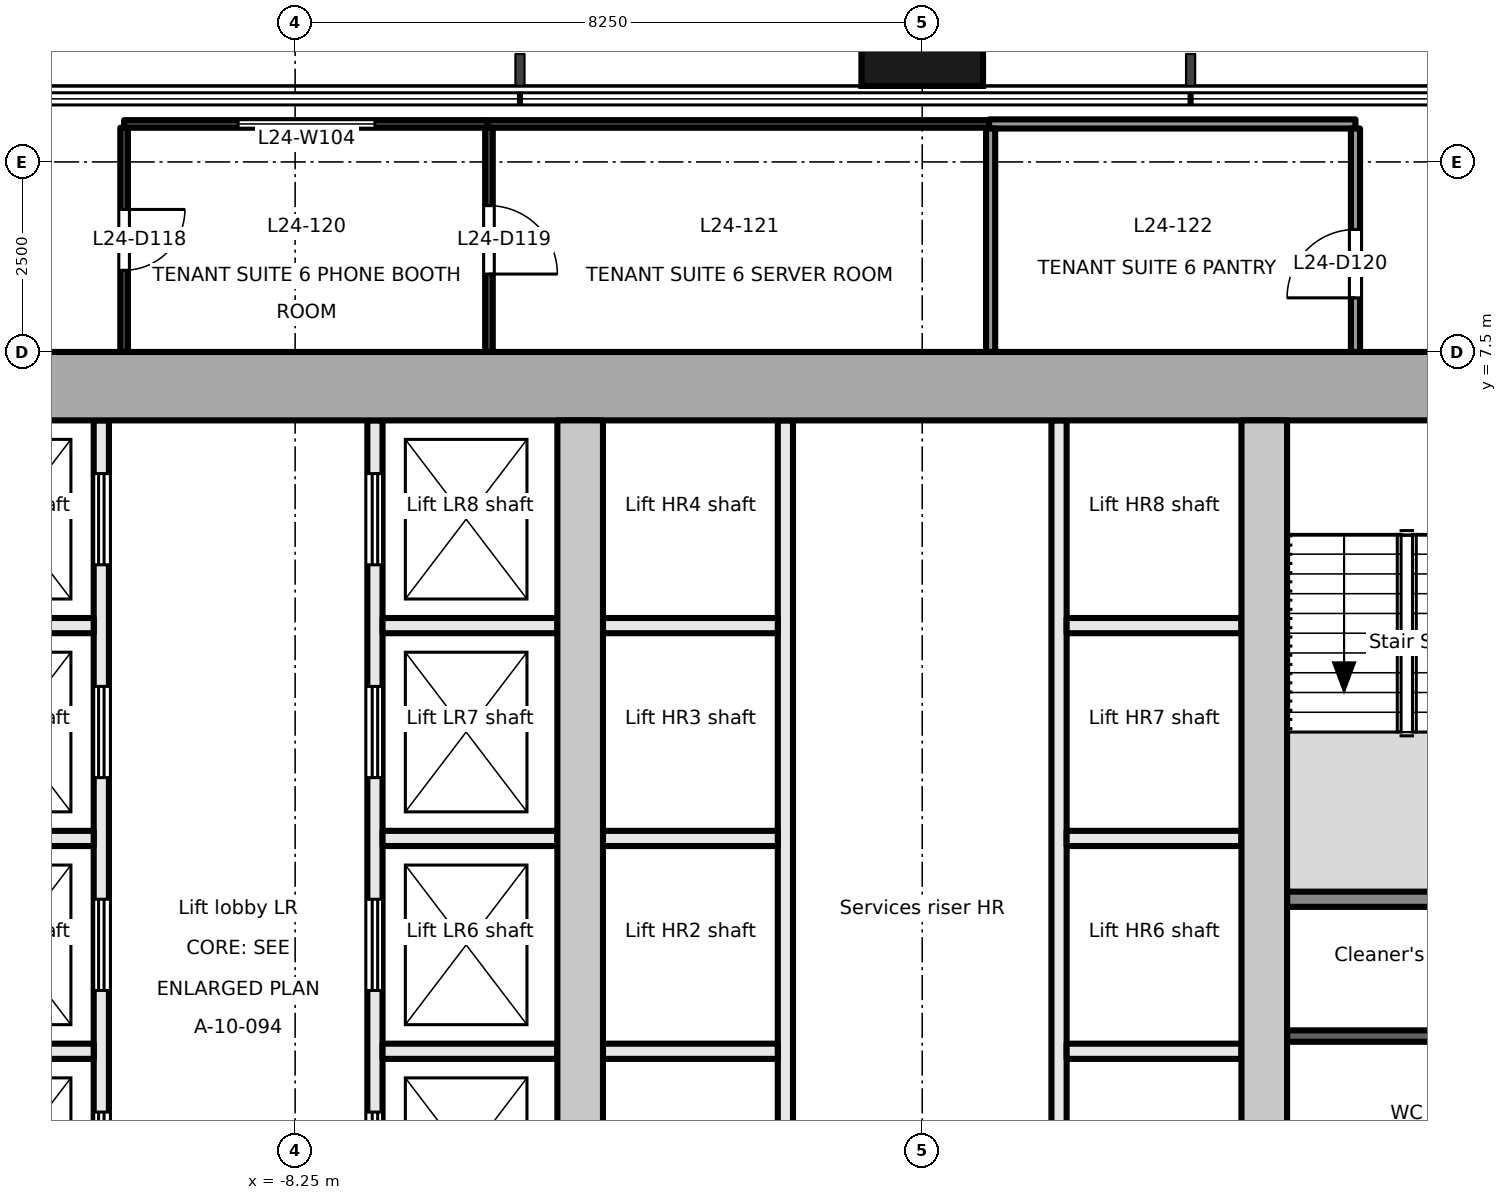
"""IFC4 building model, lengths in metres.
Left out: names, types, materials, properties, quantities, classifications, styles, units other than length and angle.
Written with IfcOpenShell. Run it as: python <this file> out.ifc"""

import sys

from ifc_helpers import new_model, si_unit, direction, frame, frame_2d, origin, origin_2d, place, context, subcontext, project, spatial, rectangle, extrude, element, fill, save


model = new_model("IFC4")
c1 = context("Model", 3, precision=1e-05, world=origin(), true_north=direction((0.0, 1.0)))
c2 = subcontext(c1, "Body", "Model", "MODEL_VIEW")
j1 = project(units=[si_unit("LENGTHUNIT", "METRE"), si_unit("PLANEANGLEUNIT", "RADIAN")], contexts=[c1])
p1 = place(None, origin())
s1 = spatial("IfcSite", under=j1, at=p1, CompositionType="ELEMENT")
p2 = place(p1, origin())
s2 = spatial("IfcBuilding", under=s1, at=p2, CompositionType="ELEMENT")
p3 = place(p2, frame((0.0, 0.0, 107.7)))
s3 = spatial("IfcBuildingStorey", under=s2, at=p3, CompositionType="ELEMENT", Elevation=107.7)
p4 = place(p3, frame((0.0, 11.9, -0.2), z_axis=(0.0, 0.0, 1.0), x_axis=(1.0, 0.0, 0.0)))
e1 = element("IfcColumn", 1, at=p4, inside=s3, PredefinedType="COLUMN", context=c2, shape_type="SweptSolid", body=[
    extrude(rectangle(XDim=1.6, YDim=1.8, at=origin_2d()), origin(), (0.0, 0.0, 1.0), 4.0),
])
p5 = place(p3, frame((-18.0, 7.05, -0.2), z_axis=(0.0, 0.0, 1.0), x_axis=(1.0, 0.0, 0.0)))
e2 = element("IfcWall", 2, at=p5, inside=s3, PredefinedType="SHEAR", context=c2, shape_type="SweptSolid", body=[
    extrude(rectangle(XDim=36.0, YDim=0.9, at=frame_2d((18.0, 0.0))), origin(), (0.0, 0.0, 1.0), 4.0),
])
for number, where, z_axis, x_axis in (
    (3, (-4.5, -6.6, -0.2), (0.0, 0.0, 1.0), (0.0, 1.0, 0.0)),
    (4, (4.5, -6.6, -0.2), (0.0, 0.0, 1.0), (0.0, 1.0, 0.0)),
):
    element("IfcWall", number, at=place(p3, frame(where, z_axis=z_axis, x_axis=x_axis)), inside=s3, PredefinedType="SHEAR", context=c2, shape_type="SweptSolid", body=[
        extrude(rectangle(XDim=13.2, YDim=0.6, at=frame_2d((6.6, 0.0))), origin(), (0.0, 0.0, 1.0), 4.0),
    ])
p6 = place(p3, frame((-10.8, -6.6, 0.0), z_axis=(0.0, 0.0, 1.0), x_axis=(0.0, 1.0, 0.0)))
e5 = element("IfcWall", 5, at=p6, inside=s3, PredefinedType="PARTITIONING", context=c2, shape_type="SweptSolid", body=[
    extrude(rectangle(XDim=13.2, YDim=0.2, at=frame_2d((6.6, 0.0))), origin(), (0.0, 0.0, 1.0), 3.8),
])
p7 = place(p6, frame((0.55, 0.0, 0.0)))
e6 = element("IfcOpeningElement", 6, at=p7, cuts=e5, PredefinedType="OPENING", context=c2, shape_type="SweptSolid", body=[
    extrude(rectangle(XDim=0.9, YDim=2.1, at=frame_2d((0.45, 1.05))), frame((0.0, 0.111, 0.0), z_axis=(0.0, -1.0, 0.0), x_axis=(1.0, 0.0, 0.0)), (0.0, 0.0, 1.0), 0.221),
])
p8 = place(p6, frame((2.9, 0.0, 0.0)))
e7 = element("IfcOpeningElement", 7, at=p8, cuts=e5, PredefinedType="OPENING", context=c2, shape_type="SweptSolid", body=[
    extrude(rectangle(XDim=1.2, YDim=2.1, at=frame_2d((0.6, 1.05))), frame((0.0, 0.111, 0.0), z_axis=(0.0, -1.0, 0.0), x_axis=(1.0, 0.0, 0.0)), (0.0, 0.0, 1.0), 0.221),
])
p9 = place(p6, frame((5.7, 0.0, 0.0)))
e8 = element("IfcOpeningElement", 8, at=p9, cuts=e5, PredefinedType="OPENING", context=c2, shape_type="SweptSolid", body=[
    extrude(rectangle(XDim=1.2, YDim=2.1, at=frame_2d((0.6, 1.05))), frame((0.0, 0.111, 0.0), z_axis=(0.0, -1.0, 0.0), x_axis=(1.0, 0.0, 0.0)), (0.0, 0.0, 1.0), 0.221),
])
p10 = place(p6, frame((8.5, 0.0, 0.0)))
e9 = element("IfcOpeningElement", 9, at=p10, cuts=e5, PredefinedType="OPENING", context=c2, shape_type="SweptSolid", body=[
    extrude(rectangle(XDim=1.2, YDim=2.1, at=frame_2d((0.6, 1.05))), frame((0.0, 0.111, 0.0), z_axis=(0.0, -1.0, 0.0), x_axis=(1.0, 0.0, 0.0)), (0.0, 0.0, 1.0), 0.221),
])
p11 = place(p6, frame((11.3, 0.0, 0.0)))
e10 = element("IfcOpeningElement", 10, at=p11, cuts=e5, PredefinedType="OPENING", context=c2, shape_type="SweptSolid", body=[
    extrude(rectangle(XDim=1.2, YDim=2.1, at=frame_2d((0.6, 1.05))), frame((0.0, 0.111, 0.0), z_axis=(0.0, -1.0, 0.0), x_axis=(1.0, 0.0, 0.0)), (0.0, 0.0, 1.0), 0.221),
])
p12 = place(p3, frame((-7.2, -6.6, 0.0), z_axis=(0.0, 0.0, 1.0), x_axis=(0.0, 1.0, 0.0)))
e11 = element("IfcWall", 11, at=p12, inside=s3, PredefinedType="PARTITIONING", context=c2, shape_type="SweptSolid", body=[
    extrude(rectangle(XDim=13.2, YDim=0.2, at=frame_2d((6.6, 0.0))), origin(), (0.0, 0.0, 1.0), 3.8),
])
p13 = place(p12, frame((0.55, 0.0, 0.0)))
e12 = element("IfcOpeningElement", 12, at=p13, cuts=e11, PredefinedType="OPENING", context=c2, shape_type="SweptSolid", body=[
    extrude(rectangle(XDim=0.9, YDim=2.1, at=frame_2d((0.45, 1.05))), frame((0.0, 0.111, 0.0), z_axis=(0.0, -1.0, 0.0), x_axis=(1.0, 0.0, 0.0)), (0.0, 0.0, 1.0), 0.221),
])
p14 = place(p12, frame((2.9, 0.0, 0.0)))
e13 = element("IfcOpeningElement", 13, at=p14, cuts=e11, PredefinedType="OPENING", context=c2, shape_type="SweptSolid", body=[
    extrude(rectangle(XDim=1.2, YDim=2.1, at=frame_2d((0.6, 1.05))), frame((0.0, 0.111, 0.0), z_axis=(0.0, -1.0, 0.0), x_axis=(1.0, 0.0, 0.0)), (0.0, 0.0, 1.0), 0.221),
])
p15 = place(p12, frame((5.7, 0.0, 0.0)))
e14 = element("IfcOpeningElement", 14, at=p15, cuts=e11, PredefinedType="OPENING", context=c2, shape_type="SweptSolid", body=[
    extrude(rectangle(XDim=1.2, YDim=2.1, at=frame_2d((0.6, 1.05))), frame((0.0, 0.111, 0.0), z_axis=(0.0, -1.0, 0.0), x_axis=(1.0, 0.0, 0.0)), (0.0, 0.0, 1.0), 0.221),
])
p16 = place(p12, frame((8.5, 0.0, 0.0)))
e15 = element("IfcOpeningElement", 15, at=p16, cuts=e11, PredefinedType="OPENING", context=c2, shape_type="SweptSolid", body=[
    extrude(rectangle(XDim=1.2, YDim=2.1, at=frame_2d((0.6, 1.05))), frame((0.0, 0.111, 0.0), z_axis=(0.0, -1.0, 0.0), x_axis=(1.0, 0.0, 0.0)), (0.0, 0.0, 1.0), 0.221),
])
p17 = place(p12, frame((11.3, 0.0, 0.0)))
e16 = element("IfcOpeningElement", 16, at=p17, cuts=e11, PredefinedType="OPENING", context=c2, shape_type="SweptSolid", body=[
    extrude(rectangle(XDim=1.2, YDim=2.1, at=frame_2d((0.6, 1.05))), frame((0.0, 0.111, 0.0), z_axis=(0.0, -1.0, 0.0), x_axis=(1.0, 0.0, 0.0)), (0.0, 0.0, 1.0), 0.221),
])
for number, where, z_axis, x_axis in (
    (17, (-13.2, -1.7, 0.0), (0.0, 0.0, 1.0), (1.0, 0.0, 0.0)),
    (18, (-13.2, 1.1, 0.0), (0.0, 0.0, 1.0), (1.0, 0.0, 0.0)),
    (19, (-13.2, 3.9, 0.0), (0.0, 0.0, 1.0), (1.0, 0.0, 0.0)),
    (20, (-7.1, -1.7, 0.0), (0.0, 0.0, 1.0), (1.0, 0.0, 0.0)),
    (21, (-7.1, 1.1, 0.0), (0.0, 0.0, 1.0), (1.0, 0.0, 0.0)),
    (22, (-7.1, 3.9, 0.0), (0.0, 0.0, 1.0), (1.0, 0.0, 0.0)),
):
    element("IfcWall", number, at=place(p3, frame(where, z_axis=z_axis, x_axis=x_axis)), inside=s3, PredefinedType="PARTITIONING", context=c2, shape_type="SweptSolid", body=[
        extrude(rectangle(XDim=2.3, YDim=0.2, at=frame_2d((1.15, 0.0))), origin(), (0.0, 0.0, 1.0), 3.8),
    ])
p18 = place(p3, frame((-1.8, -6.6, 0.0), z_axis=(0.0, 0.0, 1.0), x_axis=(0.0, 1.0, 0.0)))
e23 = element("IfcWall", 23, at=p18, inside=s3, PredefinedType="PARTITIONING", context=c2, shape_type="SweptSolid", body=[
    extrude(rectangle(XDim=13.2, YDim=0.2, at=frame_2d((6.6, 0.0))), origin(), (0.0, 0.0, 1.0), 3.8),
])
p19 = place(p18, frame((0.55, 0.0, 0.0)))
e24 = element("IfcOpeningElement", 24, at=p19, cuts=e23, PredefinedType="OPENING", context=c2, shape_type="SweptSolid", body=[
    extrude(rectangle(XDim=0.9, YDim=2.1, at=frame_2d((0.45, 1.05))), frame((0.0, 0.111, 0.0), z_axis=(0.0, -1.0, 0.0), x_axis=(1.0, 0.0, 0.0)), (0.0, 0.0, 1.0), 0.221),
])
p20 = place(p3, frame((1.8, -6.6, 0.0), z_axis=(0.0, 0.0, 1.0), x_axis=(0.0, 1.0, 0.0)))
e25 = element("IfcWall", 25, at=p20, inside=s3, PredefinedType="PARTITIONING", context=c2, shape_type="SweptSolid", body=[
    extrude(rectangle(XDim=13.2, YDim=0.2, at=frame_2d((6.6, 0.0))), origin(), (0.0, 0.0, 1.0), 3.8),
])
p21 = place(p20, frame((0.55, 0.0, 0.0)))
e26 = element("IfcOpeningElement", 26, at=p21, cuts=e25, PredefinedType="OPENING", context=c2, shape_type="SweptSolid", body=[
    extrude(rectangle(XDim=0.9, YDim=2.1, at=frame_2d((0.45, 1.05))), frame((0.0, 0.111, 0.0), z_axis=(0.0, -1.0, 0.0), x_axis=(1.0, 0.0, 0.0)), (0.0, 0.0, 1.0), 0.221),
])
for number, where, z_axis, x_axis in (
    (27, (-4.2, -1.7, 0.0), (0.0, 0.0, 1.0), (1.0, 0.0, 0.0)),
    (28, (-4.2, 1.1, 0.0), (0.0, 0.0, 1.0), (1.0, 0.0, 0.0)),
    (29, (-4.2, 3.9, 0.0), (0.0, 0.0, 1.0), (1.0, 0.0, 0.0)),
    (30, (1.9, -1.7, 0.0), (0.0, 0.0, 1.0), (1.0, 0.0, 0.0)),
    (31, (1.9, 1.1, 0.0), (0.0, 0.0, 1.0), (1.0, 0.0, 0.0)),
    (32, (1.9, 3.9, 0.0), (0.0, 0.0, 1.0), (1.0, 0.0, 0.0)),
):
    element("IfcWall", number, at=place(p3, frame(where, z_axis=z_axis, x_axis=x_axis)), inside=s3, PredefinedType="PARTITIONING", context=c2, shape_type="SweptSolid", body=[
        extrude(rectangle(XDim=2.3, YDim=0.2, at=frame_2d((1.15, 0.0))), origin(), (0.0, 0.0, 1.0), 3.8),
    ])
p22 = place(p3, frame((4.8, 0.3, 0.0), z_axis=(0.0, 0.0, 1.0), x_axis=(1.0, 0.0, 0.0)))
e33 = element("IfcWall", 33, at=p22, inside=s3, PredefinedType="PARTITIONING", context=c2, shape_type="SweptSolid", body=[
    extrude(rectangle(XDim=3.15, YDim=0.2, at=frame_2d((1.575, 0.0))), origin(), (0.0, 0.0, 1.0), 3.8),
])
p23 = place(p3, frame((4.8, -1.5, 0.0), z_axis=(0.0, 0.0, 1.0), x_axis=(1.0, 0.0, 0.0)))
e34 = element("IfcWall", 34, at=p23, inside=s3, PredefinedType="PARTITIONING", context=c2, shape_type="SweptSolid", body=[
    extrude(rectangle(XDim=3.15, YDim=0.15, at=frame_2d((1.575, 0.0))), origin(), (0.0, 0.0, 1.0), 3.8),
])
p24 = place(p3, frame((-10.5, 10.45, 0.0), z_axis=(0.0, 0.0, 1.0), x_axis=(0.0, -1.0, 0.0)))
e35 = element("IfcWall", 35, at=p24, inside=s3, PredefinedType="PARTITIONING", context=c2, shape_type="SweptSolid", body=[
    extrude(rectangle(XDim=2.95, YDim=0.1, at=frame_2d((1.475, 0.0))), origin(), (0.0, 0.0, 1.0), 3.8),
])
p25 = place(p24, frame((1.075, 0.0, 0.0)))
e36 = element("IfcOpeningElement", 36, at=p25, cuts=e35, PredefinedType="OPENING", context=c2, shape_type="SweptSolid", body=[
    extrude(rectangle(XDim=0.8, YDim=2.1, at=frame_2d((0.4, 1.05))), frame((0.0, 0.061, 0.0), z_axis=(0.0, -1.0, 0.0), x_axis=(1.0, 0.0, 0.0)), (0.0, 0.0, 1.0), 0.121),
])
p26 = place(p3, frame((-5.72, 10.5, 0.0), z_axis=(0.0, 0.0, 1.0), x_axis=(-1.0, 0.0, 0.0)))
e37 = element("IfcWall", 37, at=p26, inside=s3, PredefinedType="PARTITIONING", context=c2, shape_type="SweptSolid", body=[
    extrude(rectangle(XDim=4.78, YDim=0.1, at=frame_2d((2.39, 0.0))), origin(), (0.0, 0.0, 1.0), 3.5),
])
p27 = place(p26, frame((1.48, 0.0, 0.9)))
e38 = element("IfcOpeningElement", 38, at=p27, cuts=e37, PredefinedType="OPENING", context=c2, shape_type="SweptSolid", body=[
    extrude(rectangle(XDim=1.8, YDim=1.2, at=frame_2d((0.9, 0.6))), frame((0.0, 0.061, 0.0), z_axis=(0.0, -1.0, 0.0), x_axis=(1.0, 0.0, 0.0)), (0.0, 0.0, 1.0), 0.121),
])
p28 = place(p3, frame((0.88, 10.5, 0.0), z_axis=(0.0, 0.0, 1.0), x_axis=(-1.0, 0.0, 0.0)))
e39 = element("IfcWall", 39, at=p28, inside=s3, PredefinedType="PARTITIONING", context=c2, shape_type="SweptSolid", body=[
    extrude(rectangle(XDim=6.6, YDim=0.1, at=frame_2d((3.3, 0.0))), origin(), (0.0, 0.0, 1.0), 3.5),
])
p29 = place(p3, frame((5.7, 10.5, 0.0), z_axis=(0.0, 0.0, 1.0), x_axis=(-1.0, 0.0, 0.0)))
e40 = element("IfcWall", 40, at=p29, inside=s3, PredefinedType="PARTITIONING", context=c2, shape_type="SweptSolid", body=[
    extrude(rectangle(XDim=4.82, YDim=0.12, at=frame_2d((2.41, 0.0))), origin(), (0.0, 0.0, 1.0), 3.5),
])
p30 = place(p3, frame((5.7, 7.5, 0.0), z_axis=(0.0, 0.0, 1.0), x_axis=(0.0, 1.0, 0.0)))
e41 = element("IfcWall", 41, at=p30, inside=s3, PredefinedType="PARTITIONING", context=c2, shape_type="SweptSolid", body=[
    extrude(rectangle(XDim=2.94, YDim=0.12, at=frame_2d((1.47, 0.0))), origin(), (0.0, 0.0, 1.0), 3.8),
])
p31 = place(p30, frame((0.712, 0.0, 0.0)))
e42 = element("IfcOpeningElement", 42, at=p31, cuts=e41, PredefinedType="OPENING", context=c2, shape_type="SweptSolid", body=[
    extrude(rectangle(XDim=0.9, YDim=2.1, at=frame_2d((0.45, 1.05))), frame((0.0, 0.071, 0.0), z_axis=(0.0, -1.0, 0.0), x_axis=(1.0, 0.0, 0.0)), (0.0, 0.0, 1.0), 0.141),
])
p32 = place(p3, frame((-5.7, 10.45, 0.0), z_axis=(0.0, 0.0, 1.0), x_axis=(0.0, -1.0, 0.0)))
e43 = element("IfcWall", 43, at=p32, inside=s3, PredefinedType="PARTITIONING", context=c2, shape_type="SweptSolid", body=[
    extrude(rectangle(XDim=2.95, YDim=0.1, at=frame_2d((1.475, 0.0))), origin(), (0.0, 0.0, 1.0), 3.8),
])
p33 = place(p32, frame((1.025, 0.0, 0.0)))
e44 = element("IfcOpeningElement", 44, at=p33, cuts=e43, PredefinedType="OPENING", context=c2, shape_type="SweptSolid", body=[
    extrude(rectangle(XDim=0.9, YDim=2.1, at=frame_2d((0.45, 1.05))), frame((0.0, 0.061, 0.0), z_axis=(0.0, -1.0, 0.0), x_axis=(1.0, 0.0, 0.0)), (0.0, 0.0, 1.0), 0.121),
])
p34 = place(p3, frame((0.9, 10.44, 0.0), z_axis=(0.0, 0.0, 1.0), x_axis=(0.0, -1.0, 0.0)))
e45 = element("IfcWall", 45, at=p34, inside=s3, PredefinedType="PARTITIONING", context=c2, shape_type="SweptSolid", body=[
    extrude(rectangle(XDim=2.94, YDim=0.12, at=frame_2d((1.47, 0.0))), origin(), (0.0, 0.0, 1.0), 3.8),
])
p35 = place(p8, origin())
e46 = element("IfcDoor", 46, at=p35, inside=s3, OperationType="DOUBLE_DOOR_SLIDING", PredefinedType="DOOR", context=c2, shape_type="SweptSolid", body=[
    extrude(rectangle(XDim=1.2, YDim=2.1, at=frame_2d((0.6, 1.05))), frame((0.0, 0.025, 0.0), z_axis=(0.0, -1.0, 0.0), x_axis=(1.0, 0.0, 0.0)), (0.0, 0.0, 1.0), 0.05),
])
fill(e7, e46)
p36 = place(p9, origin())
e47 = element("IfcDoor", 47, at=p36, inside=s3, OperationType="DOUBLE_DOOR_SLIDING", PredefinedType="DOOR", context=c2, shape_type="SweptSolid", body=[
    extrude(rectangle(XDim=1.2, YDim=2.1, at=frame_2d((0.6, 1.05))), frame((0.0, 0.025, 0.0), z_axis=(0.0, -1.0, 0.0), x_axis=(1.0, 0.0, 0.0)), (0.0, 0.0, 1.0), 0.05),
])
fill(e8, e47)
p37 = place(p10, origin())
e48 = element("IfcDoor", 48, at=p37, inside=s3, OperationType="DOUBLE_DOOR_SLIDING", PredefinedType="DOOR", context=c2, shape_type="SweptSolid", body=[
    extrude(rectangle(XDim=1.2, YDim=2.1, at=frame_2d((0.6, 1.05))), frame((0.0, 0.025, 0.0), z_axis=(0.0, -1.0, 0.0), x_axis=(1.0, 0.0, 0.0)), (0.0, 0.0, 1.0), 0.05),
])
fill(e9, e48)
p38 = place(p11, origin())
e49 = element("IfcDoor", 49, at=p38, inside=s3, OperationType="DOUBLE_DOOR_SLIDING", PredefinedType="DOOR", context=c2, shape_type="SweptSolid", body=[
    extrude(rectangle(XDim=1.2, YDim=2.1, at=frame_2d((0.6, 1.05))), frame((0.0, 0.025, 0.0), z_axis=(0.0, -1.0, 0.0), x_axis=(1.0, 0.0, 0.0)), (0.0, 0.0, 1.0), 0.05),
])
fill(e10, e49)
p39 = place(p14, origin())
e50 = element("IfcDoor", 50, at=p39, inside=s3, OperationType="DOUBLE_DOOR_SLIDING", PredefinedType="DOOR", context=c2, shape_type="SweptSolid", body=[
    extrude(rectangle(XDim=1.2, YDim=2.1, at=frame_2d((0.6, 1.05))), frame((0.0, 0.025, 0.0), z_axis=(0.0, -1.0, 0.0), x_axis=(1.0, 0.0, 0.0)), (0.0, 0.0, 1.0), 0.05),
])
fill(e13, e50)
p40 = place(p15, origin())
e51 = element("IfcDoor", 51, at=p40, inside=s3, OperationType="DOUBLE_DOOR_SLIDING", PredefinedType="DOOR", context=c2, shape_type="SweptSolid", body=[
    extrude(rectangle(XDim=1.2, YDim=2.1, at=frame_2d((0.6, 1.05))), frame((0.0, 0.025, 0.0), z_axis=(0.0, -1.0, 0.0), x_axis=(1.0, 0.0, 0.0)), (0.0, 0.0, 1.0), 0.05),
])
fill(e14, e51)
p41 = place(p16, origin())
e52 = element("IfcDoor", 52, at=p41, inside=s3, OperationType="DOUBLE_DOOR_SLIDING", PredefinedType="DOOR", context=c2, shape_type="SweptSolid", body=[
    extrude(rectangle(XDim=1.2, YDim=2.1, at=frame_2d((0.6, 1.05))), frame((0.0, 0.025, 0.0), z_axis=(0.0, -1.0, 0.0), x_axis=(1.0, 0.0, 0.0)), (0.0, 0.0, 1.0), 0.05),
])
fill(e15, e52)
p42 = place(p17, origin())
e53 = element("IfcDoor", 53, at=p42, inside=s3, OperationType="DOUBLE_DOOR_SLIDING", PredefinedType="DOOR", context=c2, shape_type="SweptSolid", body=[
    extrude(rectangle(XDim=1.2, YDim=2.1, at=frame_2d((0.6, 1.05))), frame((0.0, 0.025, 0.0), z_axis=(0.0, -1.0, 0.0), x_axis=(1.0, 0.0, 0.0)), (0.0, 0.0, 1.0), 0.05),
])
fill(e16, e53)
p43 = place(p25, origin())
e54 = element("IfcDoor", 54, at=p43, inside=s3, OperationType="SINGLE_SWING_LEFT", PredefinedType="DOOR", context=c2, shape_type="SweptSolid", body=[
    extrude(rectangle(XDim=0.8, YDim=2.1, at=frame_2d((0.4, 1.05))), frame((0.0, 0.025, 0.0), z_axis=(0.0, -1.0, 0.0), x_axis=(1.0, 0.0, 0.0)), (0.0, 0.0, 1.0), 0.05),
])
fill(e36, e54)
p44 = place(p33, origin())
e55 = element("IfcDoor", 55, at=p44, inside=s3, OperationType="SINGLE_SWING_RIGHT", PredefinedType="DOOR", context=c2, shape_type="SweptSolid", body=[
    extrude(rectangle(XDim=0.9, YDim=2.1, at=frame_2d((0.45, 1.05))), frame((0.0, 0.025, 0.0), z_axis=(0.0, -1.0, 0.0), x_axis=(1.0, 0.0, 0.0)), (0.0, 0.0, 1.0), 0.05),
])
fill(e44, e55)
p45 = place(p31, origin())
e56 = element("IfcDoor", 56, at=p45, inside=s3, OperationType="SINGLE_SWING_LEFT", PredefinedType="DOOR", context=c2, shape_type="SweptSolid", body=[
    extrude(rectangle(XDim=0.9, YDim=2.1, at=frame_2d((0.45, 1.05))), frame((0.0, 0.025, 0.0), z_axis=(0.0, -1.0, 0.0), x_axis=(1.0, 0.0, 0.0)), (0.0, 0.0, 1.0), 0.05),
])
fill(e42, e56)
p46 = place(p27, origin())
e57 = element("IfcWindow", 57, at=p46, inside=s3, PartitioningType="SINGLE_PANEL", PredefinedType="WINDOW", context=c2, shape_type="SweptSolid", body=[
    extrude(rectangle(XDim=1.8, YDim=1.2, at=frame_2d((0.9, 0.6))), frame((0.0, 0.03, 0.0), z_axis=(0.0, -1.0, 0.0), x_axis=(1.0, 0.0, 0.0)), (0.0, 0.0, 1.0), 0.06),
])
fill(e38, e57)
save(model, sys.argv[1])
